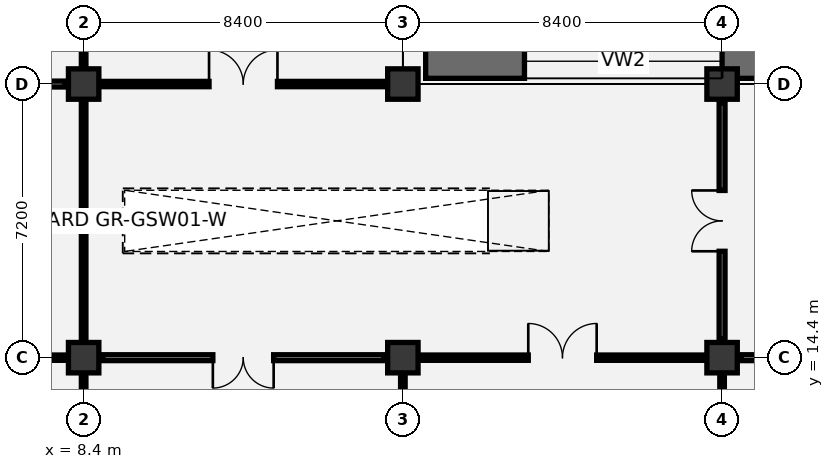
"""IFC4 building model, lengths in metres.
Left out: names, types, materials, properties, quantities, classifications, styles, units other than length and angle.
Written with IfcOpenShell. Run it as: python <this file> out.ifc"""

import sys

from ifc_helpers import new_model, si_unit, direction, frame, frame_2d, origin, origin_2d, place, context, subcontext, project, spatial, rectangle, extrude, element, fill, save


model = new_model("IFC4")
c1 = context("Model", 3, precision=1e-05, world=origin(), true_north=direction((0.0, 1.0)))
c2 = subcontext(c1, "Body", "Model", "MODEL_VIEW")
j1 = project(units=[si_unit("LENGTHUNIT", "METRE"), si_unit("PLANEANGLEUNIT", "RADIAN")], contexts=[c1])
p1 = place(None, origin())
s1 = spatial("IfcSite", under=j1, at=p1, CompositionType="ELEMENT")
p2 = place(p1, origin())
s2 = spatial("IfcBuilding", under=s1, at=p2, CompositionType="ELEMENT")
p3 = place(p2, frame((0.0, 0.0, -4.8)))
s3 = spatial("IfcBuildingStorey", under=s2, at=p3, CompositionType="ELEMENT", Elevation=-4.8)
for number, where, z_axis, x_axis in (
    (1, (8.4, 14.4, 0.0), (0.0, 0.0, 1.0), (1.0, 0.0, 0.0)),
    (2, (8.4, 21.6, 0.0), (0.0, 0.0, 1.0), (1.0, 0.0, 0.0)),
    (3, (16.8, 14.4, 0.0), (0.0, 0.0, 1.0), (1.0, 0.0, 0.0)),
    (4, (16.8, 21.6, 0.0), (0.0, 0.0, 1.0), (1.0, 0.0, 0.0)),
    (5, (25.2, 14.4, 0.0), (0.0, 0.0, 1.0), (1.0, 0.0, 0.0)),
    (6, (25.2, 21.6, 0.0), (0.0, 0.0, 1.0), (1.0, 0.0, 0.0)),
):
    element("IfcColumn", number, at=place(p3, frame(where, z_axis=z_axis, x_axis=x_axis)), inside=s3, PredefinedType="COLUMN", context=c2, shape_type="SweptSolid", body=[
        extrude(rectangle(XDim=0.8, YDim=0.8, at=origin_2d()), origin(), (0.0, 0.0, 1.0), 4.8),
    ])
p4 = place(p3, frame((17.4, 22.2, 0.0), z_axis=(0.0, 0.0, 1.0), x_axis=(1.0, 0.0, 0.0)))
e7 = element("IfcWall", 7, at=p4, inside=s3, PredefinedType="SOLIDWALL", context=c2, shape_type="SweptSolid", body=[
    extrude(rectangle(XDim=24.0, YDim=0.9, at=frame_2d((12.0, 0.0))), origin(), (0.0, 0.0, 1.0), 4.8),
])
p5 = place(p4, frame((2.6, 0.0, 0.85)))
e8 = element("IfcOpeningElement", 8, at=p5, cuts=e7, PredefinedType="OPENING", context=c2, shape_type="SweptSolid", body=[
    extrude(rectangle(XDim=5.2, YDim=2.9, at=frame_2d((2.6, 1.45))), frame((0.0, 0.46, 0.0), z_axis=(0.0, -1.0, 0.0), x_axis=(1.0, 0.0, 0.0)), (0.0, 0.0, 1.0), 0.92),
])
p6 = place(p4, frame((14.8, 0.0, 0.85)))
e9 = element("IfcOpeningElement", 9, at=p6, cuts=e7, PredefinedType="OPENING", context=c2, shape_type="SweptSolid", body=[
    extrude(rectangle(XDim=5.2, YDim=2.9, at=frame_2d((2.6, 1.45))), frame((0.0, 0.46, 0.0), z_axis=(0.0, -1.0, 0.0), x_axis=(1.0, 0.0, 0.0)), (0.0, 0.0, 1.0), 0.92),
])
p7 = place(p3, frame((8.4, 7.7, 0.0), z_axis=(0.0, 0.0, 1.0), x_axis=(0.0, 1.0, 0.0)))
e10 = element("IfcWall", 10, at=p7, inside=s3, PredefinedType="PARTITIONING", context=c2, shape_type="SweptSolid", body=[
    extrude(rectangle(XDim=6.2, YDim=0.12, at=frame_2d((3.1, 0.0))), origin(), (0.0, 0.0, 1.0), 3.645),
])
p8 = place(p3, frame((0.5, 14.4, 0.0), z_axis=(0.0, 0.0, 1.0), x_axis=(1.0, 0.0, 0.0)))
e11 = element("IfcWall", 11, at=p8, inside=s3, PredefinedType="PARTITIONING", context=c2, shape_type="SweptSolid", body=[
    extrude(rectangle(XDim=7.4, YDim=0.14, at=frame_2d((3.7, 0.0))), origin(), (0.0, 0.0, 1.0), 3.545),
])
p9 = place(p8, frame((2.8, 0.0, 0.0)))
e12 = element("IfcOpeningElement", 12, at=p9, cuts=e11, PredefinedType="OPENING", context=c2, shape_type="SweptSolid", body=[
    extrude(rectangle(XDim=1.8, YDim=2.25, at=frame_2d((0.9, 1.125))), frame((0.0, 0.08, 0.0), z_axis=(0.0, -1.0, 0.0), x_axis=(1.0, 0.0, 0.0)), (0.0, 0.0, 1.0), 0.16),
])
p10 = place(p3, frame((8.4, 14.9, 0.0), z_axis=(0.0, 0.0, 1.0), x_axis=(0.0, 1.0, 0.0)))
e13 = element("IfcWall", 13, at=p10, inside=s3, PredefinedType="PARTITIONING", context=c2, shape_type="SweptSolid", body=[
    extrude(rectangle(XDim=6.2, YDim=0.12, at=frame_2d((3.1, 0.0))), origin(), (0.0, 0.0, 1.0), 3.645),
])
p11 = place(p3, frame((0.5, 21.6, 0.0), z_axis=(0.0, 0.0, 1.0), x_axis=(1.0, 0.0, 0.0)))
e14 = element("IfcWall", 14, at=p11, inside=s3, PredefinedType="PARTITIONING", context=c2, shape_type="SweptSolid", body=[
    extrude(rectangle(XDim=7.4, YDim=0.155, at=frame_2d((3.7, 0.0))), origin(), (0.0, 0.0, 1.0), 3.545),
])
p12 = place(p11, frame((2.9, 0.0, 0.0)))
e15 = element("IfcOpeningElement", 15, at=p12, cuts=e14, PredefinedType="OPENING", context=c2, shape_type="SweptSolid", body=[
    extrude(rectangle(XDim=1.6, YDim=2.2, at=frame_2d((0.8, 1.1))), frame((0.0, 0.087, 0.0), z_axis=(0.0, -1.0, 0.0), x_axis=(1.0, 0.0, 0.0)), (0.0, 0.0, 1.0), 0.175),
])
for number, where, z_axis, x_axis in (
    (16, (8.4, 22.1, 0.0), (0.0, 0.0, 1.0), (0.0, 1.0, 0.0)),
    (17, (16.8, 7.7, 0.0), (0.0, 0.0, 1.0), (0.0, 1.0, 0.0)),
):
    element("IfcWall", number, at=place(p3, frame(where, z_axis=z_axis, x_axis=x_axis)), inside=s3, PredefinedType="PARTITIONING", context=c2, shape_type="SweptSolid", body=[
        extrude(rectangle(XDim=6.2, YDim=0.12, at=frame_2d((3.1, 0.0))), origin(), (0.0, 0.0, 1.0), 3.645),
    ])
p13 = place(p3, frame((8.9, 14.4, 0.0), z_axis=(0.0, 0.0, 1.0), x_axis=(1.0, 0.0, 0.0)))
e18 = element("IfcWall", 18, at=p13, inside=s3, PredefinedType="PARTITIONING", context=c2, shape_type="SweptSolid", body=[
    extrude(rectangle(XDim=7.4, YDim=0.155, at=frame_2d((3.7, 0.0))), origin(), (0.0, 0.0, 1.0), 3.545),
])
p14 = place(p13, frame((2.9, 0.0, 0.0)))
e19 = element("IfcOpeningElement", 19, at=p14, cuts=e18, PredefinedType="OPENING", context=c2, shape_type="SweptSolid", body=[
    extrude(rectangle(XDim=1.6, YDim=2.2, at=frame_2d((0.8, 1.1))), frame((0.0, 0.087, 0.0), z_axis=(0.0, -1.0, 0.0), x_axis=(1.0, 0.0, 0.0)), (0.0, 0.0, 1.0), 0.175),
])
p15 = place(p3, frame((8.9, 21.6, 0.0), z_axis=(0.0, 0.0, 1.0), x_axis=(1.0, 0.0, 0.0)))
e20 = element("IfcWall", 20, at=p15, inside=s3, PredefinedType="PARTITIONING", context=c2, shape_type="SweptSolid", body=[
    extrude(rectangle(XDim=7.4, YDim=0.14, at=frame_2d((3.7, 0.0))), origin(), (0.0, 0.0, 1.0), 3.545),
])
p16 = place(p15, frame((2.8, 0.0, 0.0)))
e21 = element("IfcOpeningElement", 21, at=p16, cuts=e20, PredefinedType="OPENING", context=c2, shape_type="SweptSolid", body=[
    extrude(rectangle(XDim=1.8, YDim=2.25, at=frame_2d((0.9, 1.125))), frame((0.0, 0.08, 0.0), z_axis=(0.0, -1.0, 0.0), x_axis=(1.0, 0.0, 0.0)), (0.0, 0.0, 1.0), 0.16),
])
p17 = place(p3, frame((25.2, 7.7, 0.0), z_axis=(0.0, 0.0, 1.0), x_axis=(0.0, 1.0, 0.0)))
e22 = element("IfcWall", 22, at=p17, inside=s3, PredefinedType="PARTITIONING", context=c2, shape_type="SweptSolid", body=[
    extrude(rectangle(XDim=6.2, YDim=0.12, at=frame_2d((3.1, 0.0))), origin(), (0.0, 0.0, 1.0), 3.645),
])
p18 = place(p3, frame((17.3, 14.4, 0.0), z_axis=(0.0, 0.0, 1.0), x_axis=(1.0, 0.0, 0.0)))
e23 = element("IfcWall", 23, at=p18, inside=s3, PredefinedType="PARTITIONING", context=c2, shape_type="SweptSolid", body=[
    extrude(rectangle(XDim=7.4, YDim=0.14, at=frame_2d((3.7, 0.0))), origin(), (0.0, 0.0, 1.0), 3.545),
])
p19 = place(p18, frame((2.8, 0.0, 0.0)))
e24 = element("IfcOpeningElement", 24, at=p19, cuts=e23, PredefinedType="OPENING", context=c2, shape_type="SweptSolid", body=[
    extrude(rectangle(XDim=1.8, YDim=2.25, at=frame_2d((0.9, 1.125))), frame((0.0, 0.08, 0.0), z_axis=(0.0, -1.0, 0.0), x_axis=(1.0, 0.0, 0.0)), (0.0, 0.0, 1.0), 0.16),
])
p20 = place(p3, frame((25.2, 14.9, 0.0), z_axis=(0.0, 0.0, 1.0), x_axis=(0.0, 1.0, 0.0)))
e25 = element("IfcWall", 25, at=p20, inside=s3, PredefinedType="PARTITIONING", context=c2, shape_type="SweptSolid", body=[
    extrude(rectangle(XDim=6.2, YDim=0.155, at=frame_2d((3.1, 0.0))), origin(), (0.0, 0.0, 1.0), 3.645),
])
p21 = place(p20, frame((2.3, 0.0, 0.0)))
e26 = element("IfcOpeningElement", 26, at=p21, cuts=e25, PredefinedType="OPENING", context=c2, shape_type="SweptSolid", body=[
    extrude(rectangle(XDim=1.6, YDim=2.2, at=frame_2d((0.8, 1.1))), frame((0.0, 0.087, 0.0), z_axis=(0.0, -1.0, 0.0), x_axis=(1.0, 0.0, 0.0)), (0.0, 0.0, 1.0), 0.175),
])
p22 = place(p3, frame((25.7, 14.4, 0.0), z_axis=(0.0, 0.0, 1.0), x_axis=(1.0, 0.0, 0.0)))
e27 = element("IfcWall", 27, at=p22, inside=s3, PredefinedType="PARTITIONING", context=c2, shape_type="SweptSolid", body=[
    extrude(rectangle(XDim=7.4, YDim=0.155, at=frame_2d((3.7, 0.0))), origin(), (0.0, 0.0, 1.0), 3.545),
])
p23 = place(p22, frame((2.9, 0.0, 0.0)))
e28 = element("IfcOpeningElement", 28, at=p23, cuts=e27, PredefinedType="OPENING", context=c2, shape_type="SweptSolid", body=[
    extrude(rectangle(XDim=1.6, YDim=2.2, at=frame_2d((0.8, 1.1))), frame((0.0, 0.087, 0.0), z_axis=(0.0, -1.0, 0.0), x_axis=(1.0, 0.0, 0.0)), (0.0, 0.0, 1.0), 0.175),
])
p24 = place(p5, origin())
e29 = element("IfcWindow", 29, at=p24, inside=s3, PartitioningType="SINGLE_PANEL", PredefinedType="WINDOW", context=c2, shape_type="SweptSolid", body=[
    extrude(rectangle(XDim=5.2, YDim=2.9, at=frame_2d((2.6, 1.45))), frame((0.0, 0.175, 0.0), z_axis=(0.0, -1.0, 0.0), x_axis=(1.0, 0.0, 0.0)), (0.0, 0.0, 1.0), 0.35),
])
fill(e8, e29)
p25 = place(p14, frame((1.6, 0.0, 0.0), z_axis=(0.0, 0.0, 1.0), x_axis=(-1.0, 0.0, 0.0)))
e30 = element("IfcDoor", 30, at=p25, inside=s3, OperationType="DOUBLE_DOOR_SINGLE_SWING", PredefinedType="DOOR", context=c2, shape_type="SweptSolid", body=[
    extrude(rectangle(XDim=1.6, YDim=2.2, at=frame_2d((0.8, 1.1))), frame((0.0, 0.025, 0.0), z_axis=(0.0, -1.0, 0.0), x_axis=(1.0, 0.0, 0.0)), (0.0, 0.0, 1.0), 0.05),
])
fill(e19, e30)
p26 = place(p16, origin())
e31 = element("IfcDoor", 31, at=p26, inside=s3, OperationType="DOUBLE_DOOR_SINGLE_SWING", PredefinedType="DOOR", context=c2, shape_type="SweptSolid", body=[
    extrude(rectangle(XDim=1.8, YDim=2.25, at=frame_2d((0.9, 1.125))), frame((0.0, 0.025, 0.0), z_axis=(0.0, -1.0, 0.0), x_axis=(1.0, 0.0, 0.0)), (0.0, 0.0, 1.0), 0.05),
])
fill(e21, e31)
p27 = place(p19, origin())
e32 = element("IfcDoor", 32, at=p27, inside=s3, OperationType="DOUBLE_DOOR_SINGLE_SWING", PredefinedType="DOOR", context=c2, shape_type="SweptSolid", body=[
    extrude(rectangle(XDim=1.8, YDim=2.25, at=frame_2d((0.9, 1.125))), frame((0.0, 0.025, 0.0), z_axis=(0.0, -1.0, 0.0), x_axis=(1.0, 0.0, 0.0)), (0.0, 0.0, 1.0), 0.05),
])
fill(e24, e32)
p28 = place(p21, origin())
e33 = element("IfcDoor", 33, at=p28, inside=s3, OperationType="DOUBLE_DOOR_SINGLE_SWING", PredefinedType="DOOR", context=c2, shape_type="SweptSolid", body=[
    extrude(rectangle(XDim=1.6, YDim=2.2, at=frame_2d((0.8, 1.1))), frame((0.0, 0.025, 0.0), z_axis=(0.0, -1.0, 0.0), x_axis=(1.0, 0.0, 0.0)), (0.0, 0.0, 1.0), 0.05),
])
fill(e26, e33)
save(model, sys.argv[1])
